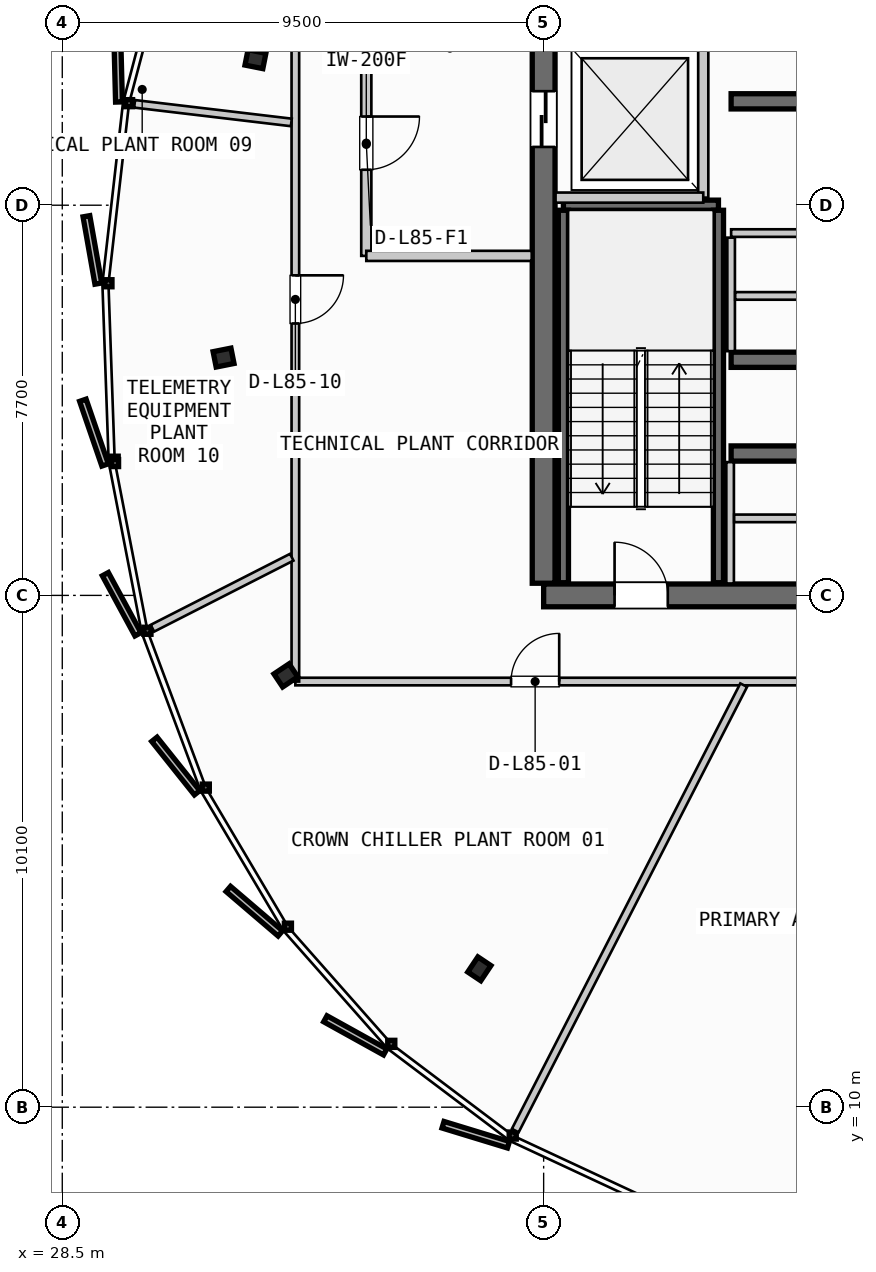
"""IFC4 building model, lengths in metres.
Left out: names, types, materials, properties, quantities, classifications, styles, units other than length and angle.
Written with IfcOpenShell. Run it as: python <this file> out.ifc"""

import sys

from ifc_helpers import new_model, si_unit, direction, frame, frame_2d, origin, origin_2d, place, context, subcontext, project, spatial, rectangle, i_section, extrude, source, transform, mapped, element, fill, save


model = new_model("IFC4")
c1 = context("Model", 3, precision=1e-05, world=origin(), true_north=direction((0.0, 1.0)))
c2 = subcontext(c1, "Body", "Model", "MODEL_VIEW")
j1 = project(units=[si_unit("LENGTHUNIT", "METRE"), si_unit("PLANEANGLEUNIT", "RADIAN")], contexts=[c1])
p1 = place(None, origin())
s1 = spatial("IfcSite", under=j1, at=p1, CompositionType="ELEMENT")
p2 = place(p1, origin())
s2 = spatial("IfcBuilding", under=s1, at=p2, CompositionType="ELEMENT")
p3 = place(p2, frame((0.0, 0.0, 320.3)))
s3 = spatial("IfcBuildingStorey", under=s2, at=p3, CompositionType="ELEMENT", Elevation=320.3)
p4 = place(p3, frame((38.0, 20.1, 0.0), z_axis=(0.0, 0.0, 1.0), x_axis=(1.0, 0.0, 0.0)))
e1 = element("IfcWall", 1, at=p4, inside=s3, PredefinedType="SHEAR", context=c2, shape_type="SweptSolid", body=[
    extrude(rectangle(XDim=17.6, YDim=0.45, at=frame_2d((8.8, 0.0))), origin(), (0.0, 0.0, 1.0), 3.735),
])
p5 = place(p4, frame((1.4, 0.0, 0.0)))
e2 = element("IfcOpeningElement", 2, at=p5, cuts=e1, PredefinedType="OPENING", context=c2, shape_type="SweptSolid", body=[
    extrude(rectangle(XDim=1.05, YDim=2.15, at=frame_2d((0.525, 1.075))), frame((0.0, 0.235, 0.0), z_axis=(0.0, -1.0, 0.0), x_axis=(1.0, 0.0, 0.0)), (0.0, 0.0, 1.0), 0.47),
])
p6 = place(p4, frame((15.15, 0.0, 0.0)))
e3 = element("IfcOpeningElement", 3, at=p6, cuts=e1, PredefinedType="OPENING", context=c2, shape_type="SweptSolid", body=[
    extrude(rectangle(XDim=1.05, YDim=2.15, at=frame_2d((0.525, 1.075))), frame((0.0, 0.235, 0.0), z_axis=(0.0, -1.0, 0.0), x_axis=(1.0, 0.0, 0.0)), (0.0, 0.0, 1.0), 0.47),
])
p7 = place(p4, frame((5.25, 0.0, 0.0)))
e4 = element("IfcOpeningElement", 4, at=p7, cuts=e1, PredefinedType="OPENING", context=c2, shape_type="SweptSolid", body=[
    extrude(rectangle(XDim=0.95, YDim=2.15, at=frame_2d((0.475, 1.075))), frame((0.0, 0.235, 0.0), z_axis=(0.0, -1.0, 0.0), x_axis=(1.0, 0.0, 0.0)), (0.0, 0.0, 1.0), 0.47),
])
p8 = place(p4, frame((11.4, 0.0, 0.0)))
e5 = element("IfcOpeningElement", 5, at=p8, cuts=e1, PredefinedType="OPENING", context=c2, shape_type="SweptSolid", body=[
    extrude(rectangle(XDim=0.95, YDim=2.15, at=frame_2d((0.475, 1.075))), frame((0.0, 0.235, 0.0), z_axis=(0.0, -1.0, 0.0), x_axis=(1.0, 0.0, 0.0)), (0.0, 0.0, 1.0), 0.47),
])
p9 = place(p3, frame((38.0, 35.26, 0.0), z_axis=(0.0, 0.0, 1.0), x_axis=(0.0, -1.0, 0.0)))
e6 = element("IfcWall", 6, at=p9, inside=s3, PredefinedType="SHEAR", context=c2, shape_type="SweptSolid", body=[
    extrude(rectangle(XDim=14.92, YDim=0.45, at=frame_2d((7.46, 0.0))), origin(), (0.0, 0.0, 1.0), 3.735),
])
p10 = place(p9, frame((5.21, 0.0, 0.0)))
e7 = element("IfcOpeningElement", 7, at=p10, cuts=e6, PredefinedType="OPENING", context=c2, shape_type="SweptSolid", body=[
    extrude(rectangle(XDim=1.1, YDim=2.2, at=frame_2d((0.55, 1.1))), frame((0.0, 0.235, 0.0), z_axis=(0.0, -1.0, 0.0), x_axis=(1.0, 0.0, 0.0)), (0.0, 0.0, 1.0), 0.47),
])
p11 = place(p3, frame((41.7, 22.9, 0.0), z_axis=(0.0, 0.0, 1.0), x_axis=(1.0, 0.0, 0.0)))
e8 = element("IfcWall", 8, at=p11, inside=s3, PredefinedType="SHEAR", context=c2, shape_type="SweptSolid", body=[
    extrude(rectangle(XDim=4.25, YDim=0.3, at=frame_2d((2.125, 0.0))), origin(), (0.0, 0.0, 1.0), 3.735),
])
p12 = place(p3, frame((41.7, 24.75, 0.0), z_axis=(0.0, 0.0, 1.0), x_axis=(1.0, 0.0, 0.0)))
e9 = element("IfcWall", 9, at=p12, inside=s3, PredefinedType="SHEAR", context=c2, shape_type="SweptSolid", body=[
    extrude(rectangle(XDim=4.25, YDim=0.3, at=frame_2d((2.125, 0.0))), origin(), (0.0, 0.0, 1.0), 3.735),
])
p13 = place(p12, frame((1.55, 0.0, 0.0)))
e10 = element("IfcOpeningElement", 10, at=p13, cuts=e9, PredefinedType="OPENING", context=c2, shape_type="SweptSolid", body=[
    extrude(rectangle(XDim=0.95, YDim=2.15, at=frame_2d((0.475, 1.075))), frame((0.0, 0.16, 0.0), z_axis=(0.0, -1.0, 0.0), x_axis=(1.0, 0.0, 0.0)), (0.0, 0.0, 1.0), 0.32),
])
p14 = place(p3, frame((41.7, 29.85, 0.0), z_axis=(0.0, 0.0, 1.0), x_axis=(1.0, 0.0, 0.0)))
e11 = element("IfcWall", 11, at=p14, inside=s3, PredefinedType="SHEAR", context=c2, shape_type="SweptSolid", body=[
    extrude(rectangle(XDim=4.25, YDim=0.3, at=frame_2d((2.125, 0.0))), origin(), (0.0, 0.0, 1.0), 3.735),
])
m1 = source(origin(), c2, "Body", "SweptSolid", [
    extrude(i_section(OverallWidth=0.309, OverallDepth=0.359, WebThickness=0.016, FlangeThickness=0.026, FilletRadius=0.027, at=origin_2d()), origin(), (0.0, 0.0, 1.0), 3.735),
])
for number, where, z_axis, x_axis in (
    (12, (32.312, 30.682, 0.0), (0.0, 0.0, 1.0), (-0.981, 0.195, 0.0)),
    (13, (31.683, 24.793, 0.0), (0.0, 0.0, 1.0), (-0.981, -0.195, 0.0)),
    (14, (32.913, 18.521, 0.0), (0.0, 0.0, 1.0), (-0.831, -0.556, 0.0)),
    (15, (36.731, 12.731, 0.0), (0.0, 0.0, 1.0), (-0.556, -0.831, 0.0)),
):
    element("IfcColumn", number, at=place(p3, frame(where, z_axis=z_axis, x_axis=x_axis)), inside=s3, PredefinedType="COLUMN", context=c2, shape_type="MappedRepresentation", body=[
        mapped(m1, transform((0.0, 0.0, 0.0), scale=1.0)),
    ])
p15 = place(p3, frame((38.39, 27.8, 0.0), z_axis=(0.0, 0.0, 1.0), x_axis=(1.0, 0.0, 0.0)))
e16 = element("IfcWall", 16, at=p15, inside=s3, PredefinedType="SHEAR", context=c2, shape_type="SweptSolid", body=[
    extrude(rectangle(XDim=3.06, YDim=0.2, at=frame_2d((1.53, 0.0))), origin(), (0.0, 0.0, 1.0), 3.735),
])
for number, where, z_axis, x_axis in (
    (17, (41.45, 27.7, 0.0), (0.0, 0.0, 1.0), (0.0, -1.0, 0.0)),
    (18, (38.39, 20.35, 0.0), (0.0, 0.0, 1.0), (0.0, 1.0, 0.0)),
):
    element("IfcWall", number, at=place(p3, frame(where, z_axis=z_axis, x_axis=x_axis)), inside=s3, PredefinedType="SHEAR", context=c2, shape_type="SweptSolid", body=[
        extrude(rectangle(XDim=7.35, YDim=0.2, at=frame_2d((3.675, 0.0))), origin(), (0.0, 0.0, 1.0), 3.735),
    ])
p16 = place(p3, frame((41.15, 27.95, 0.0), z_axis=(0.0, 0.0, 1.0), x_axis=(0.0, 1.0, 0.0)))
e19 = element("IfcWall", 19, at=p16, inside=s3, PredefinedType="PARTITIONING", context=c2, shape_type="SweptSolid", body=[
    extrude(rectangle(XDim=3.1, YDim=0.2, at=frame_2d((1.55, 0.0))), origin(), (0.0, 0.0, 1.0), 3.26),
])
p17 = place(p3, frame((38.235, 27.95, 0.0), z_axis=(0.0, 0.0, 1.0), x_axis=(1.0, 0.0, 0.0)))
e20 = element("IfcWall", 20, at=p17, inside=s3, PredefinedType="PARTITIONING", context=c2, shape_type="SweptSolid", body=[
    extrude(rectangle(XDim=2.915, YDim=0.2, at=frame_2d((1.458, 0.0))), origin(), (0.0, 0.0, 1.0), 3.26),
])
p18 = place(p3, frame((34.5, 31.2, 0.0), z_axis=(0.0, 0.0, 1.0), x_axis=(0.0, -1.0, 0.0)))
e21 = element("IfcWall", 21, at=p18, inside=s3, PredefinedType="PARTITIONING", context=c2, shape_type="SweptSolid", body=[
    extrude(rectangle(XDim=4.4, YDim=0.2, at=frame_2d((2.2, 0.0))), origin(), (0.0, 0.0, 1.0), 3.26),
])
p19 = place(p18, frame((1.65, 0.0, 0.0)))
e22 = element("IfcOpeningElement", 22, at=p19, cuts=e21, PredefinedType="OPENING", context=c2, shape_type="SweptSolid", body=[
    extrude(rectangle(XDim=1.05, YDim=2.15, at=frame_2d((0.525, 1.075))), frame((0.0, 0.11, 0.0), z_axis=(0.0, -1.0, 0.0), x_axis=(1.0, 0.0, 0.0)), (0.0, 0.0, 1.0), 0.22),
])
p20 = place(p3, frame((34.5, 26.8, 0.0), z_axis=(0.0, 0.0, 1.0), x_axis=(1.0, 0.0, 0.0)))
e23 = element("IfcWall", 23, at=p20, inside=s3, PredefinedType="PARTITIONING", context=c2, shape_type="SweptSolid", body=[
    extrude(rectangle(XDim=3.265, YDim=0.2, at=frame_2d((1.632, 0.0))), origin(), (0.0, 0.0, 1.0), 3.26),
])
p21 = place(p3, frame((41.68, 20.335, 0.0), z_axis=(0.0, 0.0, 1.0), x_axis=(0.0, 1.0, 0.0)))
e24 = element("IfcWall", 24, at=p21, inside=s3, PredefinedType="PARTITIONING", context=c2, shape_type="SweptSolid", body=[
    extrude(rectangle(XDim=2.395, YDim=0.15, at=frame_2d((1.198, 0.0))), origin(), (0.0, 0.0, 1.0), 3.26),
])
p22 = place(p3, frame((41.76, 21.62, 0.0), z_axis=(0.0, 0.0, 1.0), x_axis=(1.0, 0.0, 0.0)))
e25 = element("IfcWall", 25, at=p22, inside=s3, PredefinedType="PARTITIONING", context=c2, shape_type="SweptSolid", body=[
    extrude(rectangle(XDim=3.96, YDim=0.15, at=frame_2d((1.98, 0.0))), origin(), (0.0, 0.0, 1.0), 3.26),
])
p23 = place(p22, frame((1.55, 0.0, 0.0)))
e26 = element("IfcOpeningElement", 26, at=p23, cuts=e25, PredefinedType="OPENING", context=c2, shape_type="SweptSolid", body=[
    extrude(rectangle(XDim=0.85, YDim=2.15, at=frame_2d((0.425, 1.075))), frame((0.0, 0.085, 0.0), z_axis=(0.0, -1.0, 0.0), x_axis=(1.0, 0.0, 0.0)), (0.0, 0.0, 1.0), 0.17),
])
p24 = place(p3, frame((41.7, 27.25, 0.0), z_axis=(0.0, 0.0, 1.0), x_axis=(1.0, 0.0, 0.0)))
e27 = element("IfcWall", 27, at=p24, inside=s3, PredefinedType="PARTITIONING", context=c2, shape_type="SweptSolid", body=[
    extrude(rectangle(XDim=4.25, YDim=0.15, at=frame_2d((2.125, 0.0))), origin(), (0.0, 0.0, 1.0), 3.26),
])
p25 = place(p3, frame((41.7, 24.92, 0.0), z_axis=(0.0, 0.0, 1.0), x_axis=(0.0, 1.0, 0.0)))
e28 = element("IfcWall", 28, at=p25, inside=s3, PredefinedType="PARTITIONING", context=c2, shape_type="SweptSolid", body=[
    extrude(rectangle(XDim=2.24, YDim=0.15, at=frame_2d((1.12, 0.0))), origin(), (0.0, 0.0, 1.0), 3.26),
])
p26 = place(p3, frame((41.78, 26.01, 0.0), z_axis=(0.0, 0.0, 1.0), x_axis=(1.0, 0.0, 0.0)))
e29 = element("IfcWall", 29, at=p26, inside=s3, PredefinedType="PARTITIONING", context=c2, shape_type="SweptSolid", body=[
    extrude(rectangle(XDim=4.09, YDim=0.15, at=frame_2d((2.045, 0.0))), origin(), (0.0, 0.0, 1.0), 3.26),
])
p27 = place(p26, frame((1.6, 0.0, 0.0)))
e30 = element("IfcOpeningElement", 30, at=p27, cuts=e29, PredefinedType="OPENING", context=c2, shape_type="SweptSolid", body=[
    extrude(rectangle(XDim=0.85, YDim=2.15, at=frame_2d((0.425, 1.075))), frame((0.0, 0.085, 0.0), z_axis=(0.0, -1.0, 0.0), x_axis=(1.0, 0.0, 0.0)), (0.0, 0.0, 1.0), 0.17),
])
p28 = place(p3, frame((33.1, 18.4, 0.0), z_axis=(0.0, 0.0, 1.0), x_axis=(1.0, 0.0, 0.0)))
e31 = element("IfcWall", 31, at=p28, inside=s3, PredefinedType="PARTITIONING", context=c2, shape_type="SweptSolid", body=[
    extrude(rectangle(XDim=27.4, YDim=0.15, at=frame_2d((13.7, 0.0))), origin(), (0.0, 0.0, 1.0), 3.26),
])
p29 = place(p28, frame((4.257, 0.0, 0.0)))
e32 = element("IfcOpeningElement", 32, at=p29, cuts=e31, PredefinedType="OPENING", context=c2, shape_type="SweptSolid", body=[
    extrude(rectangle(XDim=0.95, YDim=2.15, at=frame_2d((0.475, 1.075))), frame((0.0, 0.085, 0.0), z_axis=(0.0, -1.0, 0.0), x_axis=(1.0, 0.0, 0.0)), (0.0, 0.0, 1.0), 0.17),
])
p30 = place(p28, frame((12.12, 0.0, 0.0)))
e33 = element("IfcOpeningElement", 33, at=p30, cuts=e31, PredefinedType="OPENING", context=c2, shape_type="SweptSolid", body=[
    extrude(rectangle(XDim=0.95, YDim=2.15, at=frame_2d((0.475, 1.075))), frame((0.0, 0.085, 0.0), z_axis=(0.0, -1.0, 0.0), x_axis=(1.0, 0.0, 0.0)), (0.0, 0.0, 1.0), 0.17),
])
p31 = place(p28, frame((19.674, 0.0, 0.0)))
e34 = element("IfcOpeningElement", 34, at=p31, cuts=e31, PredefinedType="OPENING", context=c2, shape_type="SweptSolid", body=[
    extrude(rectangle(XDim=0.95, YDim=2.15, at=frame_2d((0.475, 1.075))), frame((0.0, 0.085, 0.0), z_axis=(0.0, -1.0, 0.0), x_axis=(1.0, 0.0, 0.0)), (0.0, 0.0, 1.0), 0.17),
])
p32 = place(p3, frame((33.1, 37.2, 0.0), z_axis=(0.0, 0.0, 1.0), x_axis=(0.0, -1.0, 0.0)))
e35 = element("IfcWall", 35, at=p32, inside=s3, PredefinedType="PARTITIONING", context=c2, shape_type="SweptSolid", body=[
    extrude(rectangle(XDim=18.8, YDim=0.15, at=frame_2d((9.4, 0.0))), origin(), (0.0, 0.0, 1.0), 3.26),
])
p33 = place(p32, frame((3.703, 0.0, 0.0)))
e36 = element("IfcOpeningElement", 36, at=p33, cuts=e35, PredefinedType="OPENING", context=c2, shape_type="SweptSolid", body=[
    extrude(rectangle(XDim=0.95, YDim=2.15, at=frame_2d((0.475, 1.075))), frame((0.0, 0.085, 0.0), z_axis=(0.0, -1.0, 0.0), x_axis=(1.0, 0.0, 0.0)), (0.0, 0.0, 1.0), 0.17),
])
p34 = place(p32, frame((10.784, 0.0, 0.0)))
e37 = element("IfcOpeningElement", 37, at=p34, cuts=e35, PredefinedType="OPENING", context=c2, shape_type="SweptSolid", body=[
    extrude(rectangle(XDim=0.95, YDim=2.15, at=frame_2d((0.475, 1.075))), frame((0.0, 0.085, 0.0), z_axis=(0.0, -1.0, 0.0), x_axis=(1.0, 0.0, 0.0)), (0.0, 0.0, 1.0), 0.17),
])
p35 = place(p3, frame((33.029, 20.853, 0.0), z_axis=(0.0, 0.0, 1.0), x_axis=(-0.891015952575, -0.453971995013, 0.0)))
e38 = element("IfcWall", 38, at=p35, inside=s3, PredefinedType="PARTITIONING", context=c2, shape_type="SweptSolid", body=[
    extrude(rectangle(XDim=3.086, YDim=0.15, at=frame_2d((1.543, 0.0))), origin(), (0.0, 0.0, 1.0), 3.26),
])
p36 = place(p3, frame((41.948, 18.329, 0.0), z_axis=(0.0, 0.0, 1.0), x_axis=(-0.45632417338, -0.889813603396, 0.0)))
e39 = element("IfcWall", 39, at=p36, inside=s3, PredefinedType="PARTITIONING", context=c2, shape_type="SweptSolid", body=[
    extrude(rectangle(XDim=9.879, YDim=0.15, at=frame_2d((4.939, 0.0))), origin(), (0.0, 0.0, 1.0), 3.26),
])
p37 = place(p3, frame((33.021, 29.434, 0.0), z_axis=(0.0, 0.0, 1.0), x_axis=(-0.993026995763, 0.117887173544, 0.0)))
e40 = element("IfcWall", 40, at=p37, inside=s3, PredefinedType="PARTITIONING", context=c2, shape_type="SweptSolid", body=[
    extrude(rectangle(XDim=3.115, YDim=0.15, at=frame_2d((1.557, 0.0))), origin(), (0.0, 0.0, 1.0), 3.26),
])
m2 = source(origin(), c2, "Body", "SweptSolid", [
    extrude(rectangle(XDim=1.05, YDim=2.15, at=frame_2d((0.525, 1.075))), frame((0.0, 0.025, 0.0), z_axis=(0.0, -1.0, 0.0), x_axis=(1.0, 0.0, 0.0)), (0.0, 0.0, 1.0), 0.05),
])
p38 = place(p5, origin())
e41 = element("IfcDoor", 41, at=p38, inside=s3, OperationType="SINGLE_SWING_LEFT", PredefinedType="DOOR", context=c2, shape_type="MappedRepresentation", body=[
    mapped(m2, transform((0.0, 0.0, 0.0), scale=1.0)),
])
fill(e2, e41)
m3 = source(origin(), c2, "Body", "SweptSolid", [
    extrude(rectangle(XDim=1.1, YDim=2.2, at=frame_2d((0.55, 1.1))), frame((0.0, 0.025, 0.0), z_axis=(0.0, -1.0, 0.0), x_axis=(1.0, 0.0, 0.0)), (0.0, 0.0, 1.0), 0.05),
])
p39 = place(p10, origin())
e42 = element("IfcDoor", 42, at=p39, inside=s3, OperationType="SLIDING_TO_LEFT", PredefinedType="DOOR", context=c2, shape_type="MappedRepresentation", body=[
    mapped(m3, transform((0.0, 0.0, 0.0), scale=1.0)),
])
fill(e7, e42)
p40 = place(p19, origin())
e43 = element("IfcDoor", 43, at=p40, inside=s3, OperationType="SINGLE_SWING_LEFT", PredefinedType="DOOR", context=c2, shape_type="MappedRepresentation", body=[
    mapped(m2, transform((0.0, 0.0, 0.0), scale=1.0)),
])
fill(e22, e43)
m4 = source(origin(), c2, "Body", "SweptSolid", [
    extrude(rectangle(XDim=0.95, YDim=2.15, at=frame_2d((0.475, 1.075))), frame((0.0, 0.025, 0.0), z_axis=(0.0, -1.0, 0.0), x_axis=(1.0, 0.0, 0.0)), (0.0, 0.0, 1.0), 0.05),
])
p41 = place(p29, origin())
e44 = element("IfcDoor", 44, at=p41, inside=s3, OperationType="SINGLE_SWING_RIGHT", PredefinedType="DOOR", context=c2, shape_type="MappedRepresentation", body=[
    mapped(m4, transform((0.0, 0.0, 0.0), scale=1.0)),
])
fill(e32, e44)
p42 = place(p34, origin())
e45 = element("IfcDoor", 45, at=p42, inside=s3, OperationType="SINGLE_SWING_LEFT", PredefinedType="DOOR", context=c2, shape_type="MappedRepresentation", body=[
    mapped(m4, transform((0.0, 0.0, 0.0), scale=1.0)),
])
fill(e37, e45)
save(model, sys.argv[1])
